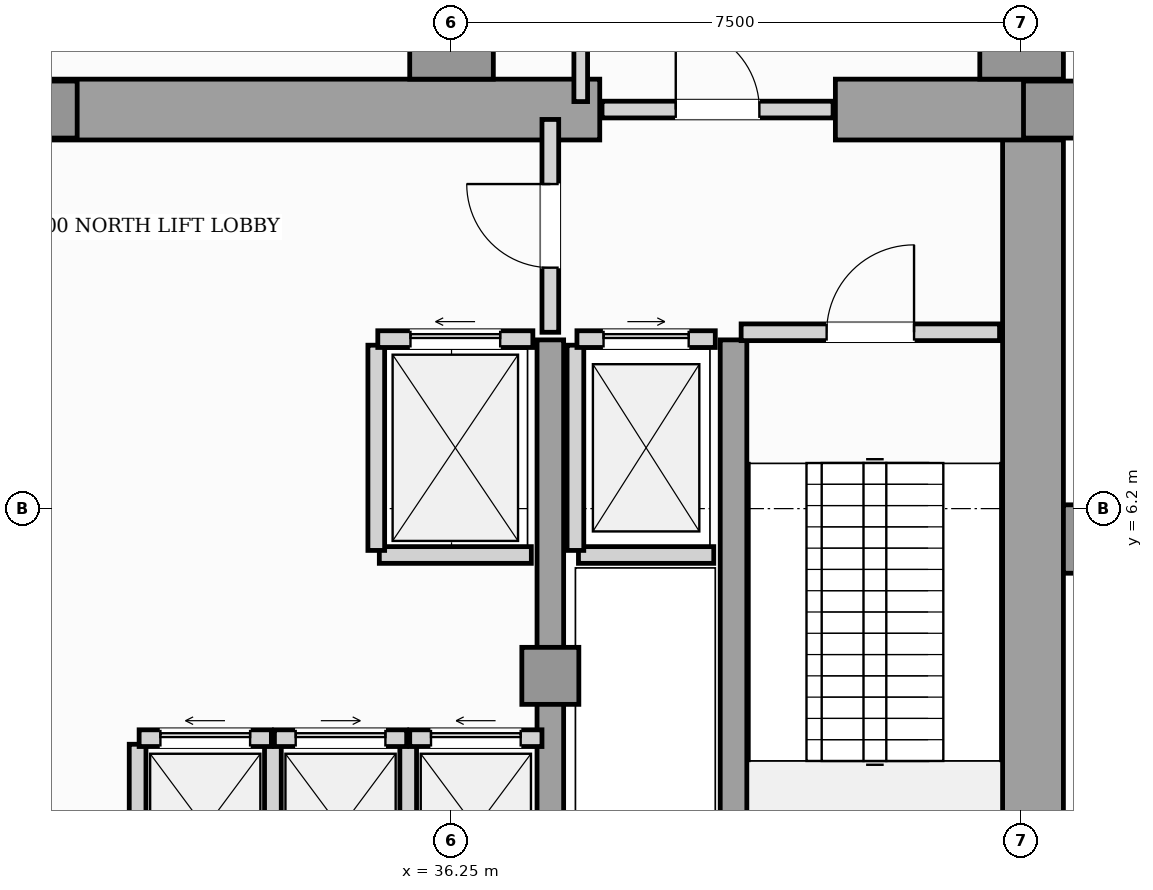
"""IFC4 building model, lengths in metres.
Left out: names, types, materials, properties, quantities, classifications, styles, units other than length and angle.
Written with IfcOpenShell. Run it as: python <this file> out.ifc"""

import sys

from ifc_helpers import new_model, si_unit, direction, frame, frame_2d, origin, origin_2d, place, context, subcontext, project, spatial, rectangle, extrude, element, fill, save


model = new_model("IFC4")
c1 = context("Model", 3, precision=1e-05, world=origin(), true_north=direction((0.0, 1.0)))
c2 = subcontext(c1, "Body", "Model", "MODEL_VIEW")
j1 = project(units=[si_unit("LENGTHUNIT", "METRE"), si_unit("PLANEANGLEUNIT", "RADIAN")], contexts=[c1])
p1 = place(None, origin())
s1 = spatial("IfcSite", under=j1, at=p1, CompositionType="ELEMENT")
p2 = place(p1, origin())
s2 = spatial("IfcBuilding", under=s1, at=p2, CompositionType="ELEMENT")
p3 = place(p2, origin())
s3 = spatial("IfcBuildingStorey", under=s2, at=p3, CompositionType="ELEMENT", Elevation=0.0)
p4 = place(p3, frame((43.9, 0.92, 0.0), z_axis=(0.0, 0.0, 1.0), x_axis=(0.0, 1.0, 0.0)))
e1 = element("IfcWall", 1, at=p4, inside=s3, PredefinedType="SHEAR", context=c2, shape_type="SweptSolid", body=[
    extrude(rectangle(XDim=10.53, YDim=0.8, at=frame_2d((5.265, 0.0))), origin(), (0.0, 0.0, 1.0), 5.1),
])
p5 = place(p3, frame((30.9, 11.45, 0.0), z_axis=(0.0, 0.0, 1.0), x_axis=(1.0, 0.0, 0.0)))
e2 = element("IfcWall", 2, at=p5, inside=s3, PredefinedType="SHEAR", context=c2, shape_type="SweptSolid", body=[
    extrude(rectangle(XDim=7.3, YDim=0.8, at=frame_2d((3.65, 0.0))), origin(), (0.0, 0.0, 1.0), 5.1),
])
p6 = place(p3, frame((41.3, 11.45, 0.0), z_axis=(0.0, 0.0, 1.0), x_axis=(1.0, 0.0, 0.0)))
e3 = element("IfcWall", 3, at=p6, inside=s3, PredefinedType="SHEAR", context=c2, shape_type="SweptSolid", body=[
    extrude(rectangle(XDim=2.95, YDim=0.8, at=frame_2d((1.475, 0.0))), origin(), (0.0, 0.0, 1.0), 5.1),
])
for number, where, z_axis, x_axis in (
    (4, (37.55, 0.92, 0.0), (0.0, 0.0, 1.0), (0.0, 1.0, 0.0)),
    (5, (39.96, 0.92, 0.0), (0.0, 0.0, 1.0), (0.0, 1.0, 0.0)),
):
    element("IfcWall", number, at=place(p3, frame(where, z_axis=z_axis, x_axis=x_axis)), inside=s3, PredefinedType="SHEAR", context=c2, shape_type="SweptSolid", body=[
        extrude(rectangle(XDim=7.5, YDim=0.35, at=frame_2d((3.75, 0.0))), origin(), (0.0, 0.0, 1.0), 5.1),
    ])
p7 = place(p3, frame((44.6, 5.8, 0.0), z_axis=(0.0, 0.0, 1.0), x_axis=(1.0, 0.0, 0.0)))
e6 = element("IfcColumn", 6, at=p7, inside=s3, PredefinedType="PILASTER", context=c2, shape_type="SweptSolid", body=[
    extrude(rectangle(XDim=0.6, YDim=0.9, at=origin_2d()), origin(), (0.0, 0.0, 1.0), 5.4),
])
for number, where, z_axis, x_axis in (
    (7, (44.15, 11.45, 0.0), (0.0, 0.0, 1.0), (1.0, 0.0, 0.0)),
    (8, (37.55, 4.0, 0.0), (0.0, 0.0, 1.0), (1.0, 0.0, 0.0)),
    (9, (30.95, 11.45, 0.0), (0.0, 0.0, 1.0), (1.0, 0.0, 0.0)),
):
    element("IfcColumn", number, at=place(p3, frame(where, z_axis=z_axis, x_axis=x_axis)), inside=s3, PredefinedType="COLUMN", context=c2, shape_type="SweptSolid", body=[
        extrude(rectangle(XDim=0.75, YDim=0.75, at=origin_2d()), origin(), (0.0, 0.0, 1.0), 5.4),
    ])
for number, where, z_axis, x_axis in (
    (10, (43.75, 12.4, 0.0), (0.0, 0.0, 1.0), (1.0, 0.0, 0.0)),
    (11, (36.25, 12.4, 0.0), (0.0, 0.0, 1.0), (1.0, 0.0, 0.0)),
):
    element("IfcColumn", number, at=place(p3, frame(where, z_axis=z_axis, x_axis=x_axis)), inside=s3, PredefinedType="COLUMN", context=c2, shape_type="SweptSolid", body=[
        extrude(rectangle(XDim=1.1, YDim=1.1, at=origin_2d()), origin(), (0.0, 0.0, 1.0), 5.4),
    ])
p8 = place(p3, frame((37.92, 5.59, 0.0), z_axis=(0.0, 0.0, 1.0), x_axis=(1.0, 0.0, 0.0)))
e12 = element("IfcWall", 12, at=p8, inside=s3, PredefinedType="SOLIDWALL", context=c2, shape_type="SweptSolid", body=[
    extrude(rectangle(XDim=1.78, YDim=0.22, at=frame_2d((0.89, 0.0))), origin(), (0.0, 0.0, 1.0), 5.1),
])
p9 = place(p3, frame((37.88, 5.65, 0.0), z_axis=(0.0, 0.0, 1.0), x_axis=(0.0, 1.0, 0.0)))
e13 = element("IfcWall", 13, at=p9, inside=s3, PredefinedType="SOLIDWALL", context=c2, shape_type="SweptSolid", body=[
    extrude(rectangle(XDim=2.7, YDim=0.22, at=frame_2d((1.35, 0.0))), origin(), (0.0, 0.0, 1.0), 5.1),
])
p10 = place(p3, frame((37.9, 8.43, 0.0), z_axis=(0.0, 0.0, 1.0), x_axis=(1.0, 0.0, 0.0)))
e14 = element("IfcWall", 14, at=p10, inside=s3, PredefinedType="SOLIDWALL", context=c2, shape_type="SweptSolid", body=[
    extrude(rectangle(XDim=1.82, YDim=0.22, at=frame_2d((0.91, 0.0))), origin(), (0.0, 0.0, 1.0), 5.1),
])
p11 = place(p10, frame((0.35, 0.0, 0.0)))
e15 = element("IfcOpeningElement", 15, at=p11, cuts=e14, PredefinedType="OPENING", context=c2, shape_type="SweptSolid", body=[
    extrude(rectangle(XDim=1.12, YDim=2.25, at=frame_2d((0.56, 1.125))), frame((0.0, 0.12, 0.0), z_axis=(0.0, -1.0, 0.0), x_axis=(1.0, 0.0, 0.0)), (0.0, 0.0, 1.0), 0.24),
])
p12 = place(p3, frame((35.3, 5.59, 0.0), z_axis=(0.0, 0.0, 1.0), x_axis=(1.0, 0.0, 0.0)))
e16 = element("IfcWall", 16, at=p12, inside=s3, PredefinedType="SOLIDWALL", context=c2, shape_type="SweptSolid", body=[
    extrude(rectangle(XDim=2.0, YDim=0.22, at=frame_2d((1.0, 0.0))), origin(), (0.0, 0.0, 1.0), 5.1),
])
p13 = place(p3, frame((35.26, 5.65, 0.0), z_axis=(0.0, 0.0, 1.0), x_axis=(0.0, 1.0, 0.0)))
e17 = element("IfcWall", 17, at=p13, inside=s3, PredefinedType="SOLIDWALL", context=c2, shape_type="SweptSolid", body=[
    extrude(rectangle(XDim=2.7, YDim=0.22, at=frame_2d((1.35, 0.0))), origin(), (0.0, 0.0, 1.0), 5.1),
])
p14 = place(p3, frame((35.28, 8.43, 0.0), z_axis=(0.0, 0.0, 1.0), x_axis=(1.0, 0.0, 0.0)))
e18 = element("IfcWall", 18, at=p14, inside=s3, PredefinedType="SOLIDWALL", context=c2, shape_type="SweptSolid", body=[
    extrude(rectangle(XDim=2.04, YDim=0.22, at=frame_2d((1.02, 0.0))), origin(), (0.0, 0.0, 1.0), 5.1),
])
p15 = place(p14, frame((0.43, 0.0, 0.0)))
e19 = element("IfcOpeningElement", 19, at=p15, cuts=e18, PredefinedType="OPENING", context=c2, shape_type="SweptSolid", body=[
    extrude(rectangle(XDim=1.18, YDim=2.2, at=frame_2d((0.59, 1.1))), frame((0.0, 0.12, 0.0), z_axis=(0.0, -1.0, 0.0), x_axis=(1.0, 0.0, 0.0)), (0.0, 0.0, 1.0), 0.24),
])
for number, where, z_axis, x_axis in (
    (20, (32.12, 0.9, 0.0), (0.0, 0.0, 1.0), (0.0, 1.0, 0.0)),
    (21, (33.9, 0.9, 0.0), (0.0, 0.0, 1.0), (0.0, 1.0, 0.0)),
):
    element("IfcWall", number, at=place(p3, frame(where, z_axis=z_axis, x_axis=x_axis)), inside=s3, PredefinedType="SOLIDWALL", context=c2, shape_type="SweptSolid", body=[
        extrude(rectangle(XDim=2.2, YDim=0.22, at=frame_2d((1.1, 0.0))), origin(), (0.0, 0.0, 1.0), 5.1),
    ])
p16 = place(p3, frame((32.14, 3.18, 0.0), z_axis=(0.0, 0.0, 1.0), x_axis=(1.0, 0.0, 0.0)))
e22 = element("IfcWall", 22, at=p16, inside=s3, PredefinedType="SOLIDWALL", context=c2, shape_type="SweptSolid", body=[
    extrude(rectangle(XDim=1.74, YDim=0.22, at=frame_2d((0.87, 0.0))), origin(), (0.0, 0.0, 1.0), 5.1),
])
p17 = place(p16, frame((0.28, 0.0, 0.0)))
e23 = element("IfcOpeningElement", 23, at=p17, cuts=e22, PredefinedType="OPENING", context=c2, shape_type="SweptSolid", body=[
    extrude(rectangle(XDim=1.18, YDim=2.2, at=frame_2d((0.59, 1.1))), frame((0.0, 0.12, 0.0), z_axis=(0.0, -1.0, 0.0), x_axis=(1.0, 0.0, 0.0)), (0.0, 0.0, 1.0), 0.24),
])
p18 = place(p3, frame((35.68, 0.9, 0.0), z_axis=(0.0, 0.0, 1.0), x_axis=(0.0, 1.0, 0.0)))
e24 = element("IfcWall", 24, at=p18, inside=s3, PredefinedType="SOLIDWALL", context=c2, shape_type="SweptSolid", body=[
    extrude(rectangle(XDim=2.2, YDim=0.22, at=frame_2d((1.1, 0.0))), origin(), (0.0, 0.0, 1.0), 5.1),
])
p19 = place(p3, frame((33.92, 3.18, 0.0), z_axis=(0.0, 0.0, 1.0), x_axis=(1.0, 0.0, 0.0)))
e25 = element("IfcWall", 25, at=p19, inside=s3, PredefinedType="SOLIDWALL", context=c2, shape_type="SweptSolid", body=[
    extrude(rectangle(XDim=1.74, YDim=0.22, at=frame_2d((0.87, 0.0))), origin(), (0.0, 0.0, 1.0), 5.1),
])
p20 = place(p19, frame((0.28, 0.0, 0.0)))
e26 = element("IfcOpeningElement", 26, at=p20, cuts=e25, PredefinedType="OPENING", context=c2, shape_type="SweptSolid", body=[
    extrude(rectangle(XDim=1.18, YDim=2.2, at=frame_2d((0.59, 1.1))), frame((0.0, 0.12, 0.0), z_axis=(0.0, -1.0, 0.0), x_axis=(1.0, 0.0, 0.0)), (0.0, 0.0, 1.0), 0.24),
])
p21 = place(p3, frame((35.7, 3.18, 0.0), z_axis=(0.0, 0.0, 1.0), x_axis=(1.0, 0.0, 0.0)))
e27 = element("IfcWall", 27, at=p21, inside=s3, PredefinedType="SOLIDWALL", context=c2, shape_type="SweptSolid", body=[
    extrude(rectangle(XDim=1.74, YDim=0.22, at=frame_2d((0.87, 0.0))), origin(), (0.0, 0.0, 1.0), 5.1),
])
p22 = place(p21, frame((0.28, 0.0, 0.0)))
e28 = element("IfcOpeningElement", 28, at=p22, cuts=e27, PredefinedType="OPENING", context=c2, shape_type="SweptSolid", body=[
    extrude(rectangle(XDim=1.18, YDim=2.2, at=frame_2d((0.59, 1.1))), frame((0.0, 0.12, 0.0), z_axis=(0.0, -1.0, 0.0), x_axis=(1.0, 0.0, 0.0)), (0.0, 0.0, 1.0), 0.24),
])
p23 = place(p3, frame((40.06, 8.52, 0.0), z_axis=(0.0, 0.0, 1.0), x_axis=(1.0, 0.0, 0.0)))
e29 = element("IfcWall", 29, at=p23, inside=s3, PredefinedType="SOLIDWALL", context=c2, shape_type="SweptSolid", body=[
    extrude(rectangle(XDim=3.4, YDim=0.22, at=frame_2d((1.7, 0.0))), origin(), (0.0, 0.0, 1.0), 5.1),
])
p24 = place(p23, frame((1.125, 0.0, 0.0)))
e30 = element("IfcOpeningElement", 30, at=p24, cuts=e29, PredefinedType="OPENING", context=c2, shape_type="SweptSolid", body=[
    extrude(rectangle(XDim=1.15, YDim=2.2, at=frame_2d((0.575, 1.1))), frame((0.0, 0.12, 0.0), z_axis=(0.0, -1.0, 0.0), x_axis=(1.0, 0.0, 0.0)), (0.0, 0.0, 1.0), 0.24),
])
p25 = place(p3, frame((37.55, 8.52, 0.0), z_axis=(0.0, 0.0, 1.0), x_axis=(0.0, 1.0, 0.0)))
e31 = element("IfcWall", 31, at=p25, inside=s3, PredefinedType="SOLIDWALL", context=c2, shape_type="SweptSolid", body=[
    extrude(rectangle(XDim=2.8, YDim=0.22, at=frame_2d((1.4, 0.0))), origin(), (0.0, 0.0, 1.0), 4.555),
])
p26 = place(p25, frame((0.85, 0.0, 0.0)))
e32 = element("IfcOpeningElement", 32, at=p26, cuts=e31, PredefinedType="OPENING", context=c2, shape_type="SweptSolid", body=[
    extrude(rectangle(XDim=1.1, YDim=2.2, at=frame_2d((0.55, 1.1))), frame((0.0, 0.12, 0.0), z_axis=(0.0, -1.0, 0.0), x_axis=(1.0, 0.0, 0.0)), (0.0, 0.0, 1.0), 0.24),
])
p27 = place(p3, frame((38.23, 11.45, 0.0), z_axis=(0.0, 0.0, 1.0), x_axis=(1.0, 0.0, 0.0)))
e33 = element("IfcWall", 33, at=p27, inside=s3, PredefinedType="SOLIDWALL", context=c2, shape_type="SweptSolid", body=[
    extrude(rectangle(XDim=3.04, YDim=0.22, at=frame_2d((1.52, 0.0))), origin(), (0.0, 0.0, 1.0), 5.1),
])
p28 = place(p27, frame((0.97, 0.0, 0.0)))
e34 = element("IfcOpeningElement", 34, at=p28, cuts=e33, PredefinedType="OPENING", context=c2, shape_type="SweptSolid", body=[
    extrude(rectangle(XDim=1.1, YDim=2.2, at=frame_2d((0.55, 1.1))), frame((0.0, 0.12, 0.0), z_axis=(0.0, -1.0, 0.0), x_axis=(1.0, 0.0, 0.0)), (0.0, 0.0, 1.0), 0.24),
])
p29 = place(p3, frame((37.95, 11.555, 0.0), z_axis=(0.0, 0.0, 1.0), x_axis=(0.0, 1.0, 0.0)))
e35 = element("IfcWall", 35, at=p29, inside=s3, PredefinedType="PARTITIONING", context=c2, shape_type="SweptSolid", body=[
    extrude(rectangle(XDim=3.39, YDim=0.18, at=frame_2d((1.695, 0.0))), origin(), (0.0, 0.0, 1.0), 5.1),
])
p30 = place(p11, origin())
e36 = element("IfcDoor", 36, at=p30, inside=s3, OperationType="SLIDING_TO_RIGHT", PredefinedType="DOOR", context=c2, shape_type="SweptSolid", body=[
    extrude(rectangle(XDim=1.12, YDim=2.25, at=frame_2d((0.56, 1.125))), frame((0.0, 0.025, 0.0), z_axis=(0.0, -1.0, 0.0), x_axis=(1.0, 0.0, 0.0)), (0.0, 0.0, 1.0), 0.05),
])
fill(e15, e36)
p31 = place(p15, origin())
e37 = element("IfcDoor", 37, at=p31, inside=s3, OperationType="SLIDING_TO_LEFT", PredefinedType="DOOR", context=c2, shape_type="SweptSolid", body=[
    extrude(rectangle(XDim=1.18, YDim=2.2, at=frame_2d((0.59, 1.1))), frame((0.0, 0.025, 0.0), z_axis=(0.0, -1.0, 0.0), x_axis=(1.0, 0.0, 0.0)), (0.0, 0.0, 1.0), 0.05),
])
fill(e19, e37)
p32 = place(p17, origin())
e38 = element("IfcDoor", 38, at=p32, inside=s3, OperationType="SLIDING_TO_LEFT", PredefinedType="DOOR", context=c2, shape_type="SweptSolid", body=[
    extrude(rectangle(XDim=1.18, YDim=2.2, at=frame_2d((0.59, 1.1))), frame((0.0, 0.025, 0.0), z_axis=(0.0, -1.0, 0.0), x_axis=(1.0, 0.0, 0.0)), (0.0, 0.0, 1.0), 0.05),
])
fill(e23, e38)
p33 = place(p20, origin())
e39 = element("IfcDoor", 39, at=p33, inside=s3, OperationType="SLIDING_TO_RIGHT", PredefinedType="DOOR", context=c2, shape_type="SweptSolid", body=[
    extrude(rectangle(XDim=1.18, YDim=2.2, at=frame_2d((0.59, 1.1))), frame((0.0, 0.025, 0.0), z_axis=(0.0, -1.0, 0.0), x_axis=(1.0, 0.0, 0.0)), (0.0, 0.0, 1.0), 0.05),
])
fill(e26, e39)
p34 = place(p22, origin())
e40 = element("IfcDoor", 40, at=p34, inside=s3, OperationType="SLIDING_TO_LEFT", PredefinedType="DOOR", context=c2, shape_type="SweptSolid", body=[
    extrude(rectangle(XDim=1.18, YDim=2.2, at=frame_2d((0.59, 1.1))), frame((0.0, 0.025, 0.0), z_axis=(0.0, -1.0, 0.0), x_axis=(1.0, 0.0, 0.0)), (0.0, 0.0, 1.0), 0.05),
])
fill(e28, e40)
p35 = place(p24, origin())
e41 = element("IfcDoor", 41, at=p35, inside=s3, OperationType="SINGLE_SWING_RIGHT", PredefinedType="DOOR", context=c2, shape_type="SweptSolid", body=[
    extrude(rectangle(XDim=1.15, YDim=2.2, at=frame_2d((0.575, 1.1))), frame((0.0, 0.025, 0.0), z_axis=(0.0, -1.0, 0.0), x_axis=(1.0, 0.0, 0.0)), (0.0, 0.0, 1.0), 0.05),
])
fill(e30, e41)
p36 = place(p26, origin())
e42 = element("IfcDoor", 42, at=p36, inside=s3, OperationType="SINGLE_SWING_RIGHT", PredefinedType="DOOR", context=c2, shape_type="SweptSolid", body=[
    extrude(rectangle(XDim=1.1, YDim=2.2, at=frame_2d((0.55, 1.1))), frame((0.0, 0.025, 0.0), z_axis=(0.0, -1.0, 0.0), x_axis=(1.0, 0.0, 0.0)), (0.0, 0.0, 1.0), 0.05),
])
fill(e32, e42)
p37 = place(p28, origin())
e43 = element("IfcDoor", 43, at=p37, inside=s3, OperationType="SINGLE_SWING_LEFT", PredefinedType="DOOR", context=c2, shape_type="SweptSolid", body=[
    extrude(rectangle(XDim=1.1, YDim=2.2, at=frame_2d((0.55, 1.1))), frame((0.0, 0.025, 0.0), z_axis=(0.0, -1.0, 0.0), x_axis=(1.0, 0.0, 0.0)), (0.0, 0.0, 1.0), 0.05),
])
fill(e34, e43)
save(model, sys.argv[1])
